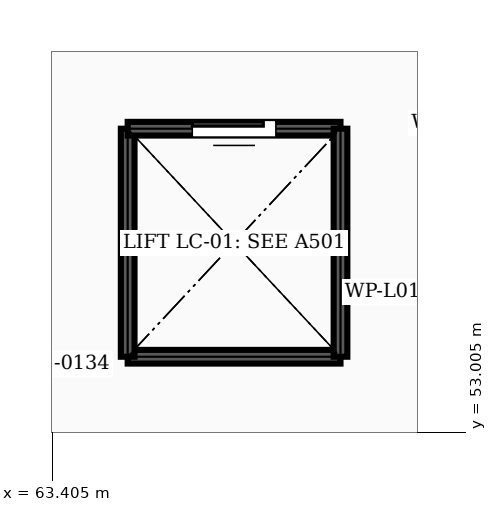
"""IFC4 building model, lengths in metres.
Left out: names, types, materials, properties, quantities, classifications, styles, units other than length and angle.
Written with IfcOpenShell. Run it as: python <this file> out.ifc"""

import sys

from ifc_helpers import new_model, si_unit, direction, frame, frame_2d, origin, place, context, subcontext, project, spatial, rectangle, extrude, element, fill, save


model = new_model("IFC4")
c1 = context("Model", 3, precision=1e-05, world=origin(), true_north=direction((0.0, 1.0)))
c2 = subcontext(c1, "Body", "Model", "MODEL_VIEW")
j1 = project(units=[si_unit("LENGTHUNIT", "METRE"), si_unit("PLANEANGLEUNIT", "RADIAN")], contexts=[c1])
p1 = place(None, origin())
s1 = spatial("IfcSite", under=j1, at=p1, CompositionType="ELEMENT")
p2 = place(p1, origin())
s2 = spatial("IfcBuilding", under=s1, at=p2, CompositionType="ELEMENT")
p3 = place(p2, frame((0.0, 0.0, 4.5)))
s3 = spatial("IfcBuildingStorey", under=s2, at=p3, CompositionType="ELEMENT", Elevation=4.5)
p4 = place(p3, frame((67.2, 54.0, 0.0), z_axis=(0.0, 0.0, 1.0), x_axis=(-1.0, 0.0, 0.0)))
e1 = element("IfcWall", 1, at=p4, inside=s3, PredefinedType="SHEAR", context=c2, shape_type="SweptSolid", body=[
    extrude(rectangle(XDim=2.8, YDim=0.18, at=frame_2d((1.4, 0.0))), origin(), (0.0, 0.0, 1.0), 3.74),
])
p5 = place(p3, frame((64.4, 54.0, 0.0), z_axis=(0.0, 0.0, 1.0), x_axis=(0.0, 1.0, 0.0)))
e2 = element("IfcWall", 2, at=p5, inside=s3, PredefinedType="SHEAR", context=c2, shape_type="SweptSolid", body=[
    extrude(rectangle(XDim=3.0, YDim=0.18, at=frame_2d((1.5, 0.0))), origin(), (0.0, 0.0, 1.0), 3.74),
])
p6 = place(p3, frame((64.4, 57.0, 0.0), z_axis=(0.0, 0.0, 1.0), x_axis=(1.0, 0.0, 0.0)))
e3 = element("IfcWall", 3, at=p6, inside=s3, PredefinedType="SHEAR", context=c2, shape_type="SweptSolid", body=[
    extrude(rectangle(XDim=2.8, YDim=0.18, at=frame_2d((1.4, 0.0))), origin(), (0.0, 0.0, 1.0), 3.74),
])
p7 = place(p6, frame((0.85, 0.0, 0.0)))
e4 = element("IfcOpeningElement", 4, at=p7, cuts=e3, PredefinedType="OPENING", context=c2, shape_type="SweptSolid", body=[
    extrude(rectangle(XDim=1.1, YDim=2.15, at=frame_2d((0.55, 1.075))), frame((0.0, 0.1, 0.0), z_axis=(0.0, -1.0, 0.0), x_axis=(1.0, 0.0, 0.0)), (0.0, 0.0, 1.0), 0.2),
])
p8 = place(p3, frame((67.2, 57.0, 0.0), z_axis=(0.0, 0.0, 1.0), x_axis=(0.0, -1.0, 0.0)))
e5 = element("IfcWall", 5, at=p8, inside=s3, PredefinedType="SHEAR", context=c2, shape_type="SweptSolid", body=[
    extrude(rectangle(XDim=3.0, YDim=0.18, at=frame_2d((1.5, 0.0))), origin(), (0.0, 0.0, 1.0), 3.74),
])
p9 = place(p3, frame((68.74, 54.85, 0.0), z_axis=(0.0, 0.0, 1.0), x_axis=(-1.0, 0.0, 0.0)))
e6 = element("IfcWall", 6, at=p9, inside=s3, PredefinedType="PARTITIONING", context=c2, shape_type="SweptSolid", body=[
    extrude(rectangle(XDim=1.24, YDim=0.1, at=frame_2d((0.62, 0.0))), origin(), (0.0, 0.0, 1.0), 3.74),
])
p10 = place(p3, frame((64.1, 53.9, 0.0), z_axis=(0.0, 0.0, 1.0), x_axis=(-1.0, 0.0, 0.0)))
e7 = element("IfcWall", 7, at=p10, inside=s3, PredefinedType="PARTITIONING", context=c2, shape_type="SweptSolid", body=[
    extrude(rectangle(XDim=1.6, YDim=0.135, at=frame_2d((0.8, 0.0))), origin(), (0.0, 0.0, 1.0), 3.74),
])
p11 = place(p7, origin())
e8 = element("IfcDoor", 8, at=p11, inside=s3, OperationType="SLIDING_TO_LEFT", PredefinedType="DOOR", context=c2, shape_type="SweptSolid", body=[
    extrude(rectangle(XDim=1.1, YDim=2.15, at=frame_2d((0.55, 1.075))), frame((0.0, 0.025, 0.0), z_axis=(0.0, -1.0, 0.0), x_axis=(1.0, 0.0, 0.0)), (0.0, 0.0, 1.0), 0.05),
])
fill(e4, e8)
save(model, sys.argv[1])
